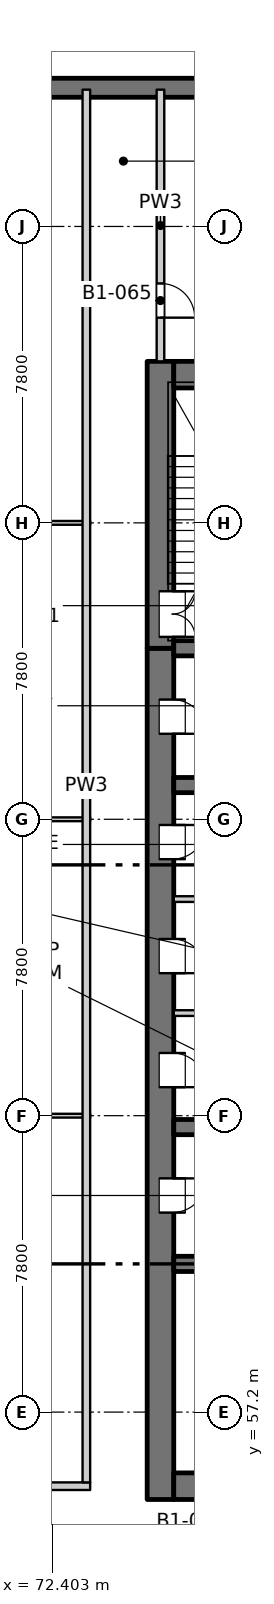
"""IFC4 building model, lengths in metres.
Left out: names, types, materials, properties, quantities, classifications, styles, units other than length and angle.
Written with IfcOpenShell. Run it as: python <this file> out.ifc"""

import sys

from ifc_helpers import new_model, si_unit, direction, frame, frame_2d, origin, place, context, subcontext, project, spatial, rectangle, extrude, element, fill, save


model = new_model("IFC4")
c1 = context("Model", 3, precision=1e-05, world=origin(), true_north=direction((0.0, 1.0)))
c2 = subcontext(c1, "Body", "Model", "MODEL_VIEW")
j1 = project(units=[si_unit("LENGTHUNIT", "METRE"), si_unit("PLANEANGLEUNIT", "RADIAN")], contexts=[c1])
p1 = place(None, origin())
s1 = spatial("IfcSite", under=j1, at=p1, CompositionType="ELEMENT")
p2 = place(p1, origin())
s2 = spatial("IfcBuilding", under=s1, at=p2, CompositionType="ELEMENT")
p3 = place(p2, frame((0.0, 0.0, -4.5)))
s3 = spatial("IfcBuildingStorey", under=s2, at=p3, CompositionType="ELEMENT", Elevation=-4.5)
p4 = place(p3, frame((42.6, 92.05, -0.35), z_axis=(0.0, 0.0, 1.0), x_axis=(1.0, 0.0, 0.0)))
e1 = element("IfcWall", 1, at=p4, inside=s3, PredefinedType="SOLIDWALL", context=c2, shape_type="SweptSolid", body=[
    extrude(rectangle(XDim=84.8, YDim=0.5, at=frame_2d((42.4, 0.0))), origin(), (0.0, 0.0, 1.0), 4.45),
])
p5 = place(p3, frame((75.25, 54.9, -0.35), z_axis=(0.0, 0.0, 1.0), x_axis=(0.0, 1.0, 0.0)))
e2 = element("IfcWall", 2, at=p5, inside=s3, PredefinedType="SOLIDWALL", context=c2, shape_type="SweptSolid", body=[
    extrude(rectangle(XDim=22.4, YDim=0.7, at=frame_2d((11.2, 0.0))), origin(), (0.0, 0.0, 1.0), 4.45),
])
p6 = place(p5, frame((7.55, 0.0, 0.35)))
e3 = element("IfcOpeningElement", 3, at=p6, cuts=e2, PredefinedType="OPENING", context=c2, shape_type="SweptSolid", body=[
    extrude(rectangle(XDim=0.9, YDim=2.1, at=frame_2d((0.45, 1.05))), frame((0.0, 0.36, 0.0), z_axis=(0.0, -1.0, 0.0), x_axis=(1.0, 0.0, 0.0)), (0.0, 0.0, 1.0), 0.72),
])
p7 = place(p5, frame((10.85, 0.0, 0.35)))
e4 = element("IfcOpeningElement", 4, at=p7, cuts=e2, PredefinedType="OPENING", context=c2, shape_type="SweptSolid", body=[
    extrude(rectangle(XDim=0.9, YDim=2.1, at=frame_2d((0.45, 1.05))), frame((0.0, 0.36, 0.0), z_axis=(0.0, -1.0, 0.0), x_axis=(1.0, 0.0, 0.0)), (0.0, 0.0, 1.0), 0.72),
])
p8 = place(p5, frame((13.85, 0.0, 0.35)))
e5 = element("IfcOpeningElement", 5, at=p8, cuts=e2, PredefinedType="OPENING", context=c2, shape_type="SweptSolid", body=[
    extrude(rectangle(XDim=0.9, YDim=2.1, at=frame_2d((0.45, 1.05))), frame((0.0, 0.36, 0.0), z_axis=(0.0, -1.0, 0.0), x_axis=(1.0, 0.0, 0.0)), (0.0, 0.0, 1.0), 0.72),
])
p9 = place(p5, frame((16.85, 0.0, 0.35)))
e6 = element("IfcOpeningElement", 6, at=p9, cuts=e2, PredefinedType="OPENING", context=c2, shape_type="SweptSolid", body=[
    extrude(rectangle(XDim=0.9, YDim=2.1, at=frame_2d((0.45, 1.05))), frame((0.0, 0.36, 0.0), z_axis=(0.0, -1.0, 0.0), x_axis=(1.0, 0.0, 0.0)), (0.0, 0.0, 1.0), 0.72),
])
p10 = place(p5, frame((20.15, 0.0, 0.35)))
e7 = element("IfcOpeningElement", 7, at=p10, cuts=e2, PredefinedType="OPENING", context=c2, shape_type="SweptSolid", body=[
    extrude(rectangle(XDim=0.9, YDim=2.1, at=frame_2d((0.45, 1.05))), frame((0.0, 0.36, 0.0), z_axis=(0.0, -1.0, 0.0), x_axis=(1.0, 0.0, 0.0)), (0.0, 0.0, 1.0), 0.72),
])
p11 = place(p3, frame((75.25, 77.3, -0.35), z_axis=(0.0, 0.0, 1.0), x_axis=(0.0, 1.0, 0.0)))
e8 = element("IfcWall", 8, at=p11, inside=s3, PredefinedType="SOLIDWALL", context=c2, shape_type="SweptSolid", body=[
    extrude(rectangle(XDim=7.55, YDim=0.7, at=frame_2d((3.775, 0.0))), origin(), (0.0, 0.0, 1.0), 4.45),
])
p12 = place(p11, frame((0.3, 0.0, 0.35)))
e9 = element("IfcOpeningElement", 9, at=p12, cuts=e8, PredefinedType="OPENING", context=c2, shape_type="SweptSolid", body=[
    extrude(rectangle(XDim=1.2, YDim=2.1, at=frame_2d((0.6, 1.05))), frame((0.0, 0.36, 0.0), z_axis=(0.0, -1.0, 0.0), x_axis=(1.0, 0.0, 0.0)), (0.0, 0.0, 1.0), 0.72),
])
p13 = place(p3, frame((75.6, 55.25, -0.35), z_axis=(0.0, 0.0, 1.0), x_axis=(1.0, 0.0, 0.0)))
e10 = element("IfcWall", 10, at=p13, inside=s3, PredefinedType="SOLIDWALL", context=c2, shape_type="SweptSolid", body=[
    extrude(rectangle(XDim=18.8, YDim=0.7, at=frame_2d((9.4, 0.0))), origin(), (0.0, 0.0, 1.0), 4.45),
])
p14 = place(p13, frame((8.65, 0.0, 0.35)))
e11 = element("IfcOpeningElement", 11, at=p14, cuts=e10, PredefinedType="OPENING", context=c2, shape_type="SweptSolid", body=[
    extrude(rectangle(XDim=1.5, YDim=2.1, at=frame_2d((0.75, 1.05))), frame((0.0, 0.36, 0.0), z_axis=(0.0, -1.0, 0.0), x_axis=(1.0, 0.0, 0.0)), (0.0, 0.0, 1.0), 0.72),
])
p15 = place(p3, frame((75.6, 84.5, -0.35), z_axis=(0.0, 0.0, 1.0), x_axis=(1.0, 0.0, 0.0)))
e12 = element("IfcWall", 12, at=p15, inside=s3, PredefinedType="SOLIDWALL", context=c2, shape_type="SweptSolid", body=[
    extrude(rectangle(XDim=18.8, YDim=0.7, at=frame_2d((9.4, 0.0))), origin(), (0.0, 0.0, 1.0), 4.45),
])
for number, where, z_axis, x_axis in (
    (13, (75.6, 61.1, -0.35), (0.0, 0.0, 1.0), (1.0, 0.0, 0.0)),
    (14, (75.6, 64.7, -0.35), (0.0, 0.0, 1.0), (1.0, 0.0, 0.0)),
    (15, (75.6, 73.7, -0.35), (0.0, 0.0, 1.0), (1.0, 0.0, 0.0)),
    (16, (75.6, 77.3, -0.35), (0.0, 0.0, 1.0), (1.0, 0.0, 0.0)),
):
    element("IfcWall", number, at=place(p3, frame(where, z_axis=z_axis, x_axis=x_axis)), inside=s3, PredefinedType="SOLIDWALL", context=c2, shape_type="SweptSolid", body=[
        extrude(rectangle(XDim=3.65, YDim=0.4, at=frame_2d((1.825, 0.0))), origin(), (0.0, 0.0, 1.0), 4.45),
    ])
p16 = place(p3, frame((59.55, 55.25, 0.0), z_axis=(0.0, 0.0, 1.0), x_axis=(1.0, 0.0, 0.0)))
e17 = element("IfcWall", 17, at=p16, inside=s3, PredefinedType="PARTITIONING", context=c2, shape_type="SweptSolid", body=[
    extrude(rectangle(XDim=13.85, YDim=0.2, at=frame_2d((6.925, 0.0))), origin(), (0.0, 0.0, 1.0), 4.1),
])
p17 = place(p3, frame((59.55, 65.0, 0.0), z_axis=(0.0, 0.0, 1.0), x_axis=(1.0, 0.0, 0.0)))
e18 = element("IfcWall", 18, at=p17, inside=s3, PredefinedType="PARTITIONING", context=c2, shape_type="SweptSolid", body=[
    extrude(rectangle(XDim=13.85, YDim=0.1, at=frame_2d((6.925, 0.0))), origin(), (0.0, 0.0, 1.0), 4.1),
])
for number, where, z_axis, x_axis in (
    (19, (75.6, 67.7, 0.0), (0.0, 0.0, 1.0), (1.0, 0.0, 0.0)),
    (20, (75.6, 70.7, 0.0), (0.0, 0.0, 1.0), (1.0, 0.0, 0.0)),
):
    element("IfcWall", number, at=place(p3, frame(where, z_axis=z_axis, x_axis=x_axis)), inside=s3, PredefinedType="PARTITIONING", context=c2, shape_type="SweptSolid", body=[
        extrude(rectangle(XDim=3.65, YDim=0.15, at=frame_2d((1.825, 0.0))), origin(), (0.0, 0.0, 1.0), 4.1),
    ])
for number, where, z_axis, x_axis in (
    (21, (59.55, 72.8, 0.0), (0.0, 0.0, 1.0), (1.0, 0.0, 0.0)),
    (22, (59.55, 80.6, 0.0), (0.0, 0.0, 1.0), (1.0, 0.0, 0.0)),
):
    element("IfcWall", number, at=place(p3, frame(where, z_axis=z_axis, x_axis=x_axis)), inside=s3, PredefinedType="PARTITIONING", context=c2, shape_type="SweptSolid", body=[
        extrude(rectangle(XDim=13.85, YDim=0.1, at=frame_2d((6.925, 0.0))), origin(), (0.0, 0.0, 1.0), 4.1),
    ])
p18 = place(p3, frame((73.3, 55.35, 0.0), z_axis=(0.0, 0.0, 1.0), x_axis=(0.0, 1.0, 0.0)))
e23 = element("IfcWall", 23, at=p18, inside=s3, PredefinedType="PARTITIONING", context=c2, shape_type="SweptSolid", body=[
    extrude(rectangle(XDim=36.65, YDim=0.2, at=frame_2d((18.325, 0.0))), origin(), (0.0, 0.0, 1.0), 4.1),
])
p19 = place(p3, frame((75.25, 84.85, 0.0), z_axis=(0.0, 0.0, 1.0), x_axis=(0.0, 1.0, 0.0)))
e24 = element("IfcWall", 24, at=p19, inside=s3, PredefinedType="PARTITIONING", context=c2, shape_type="SweptSolid", body=[
    extrude(rectangle(XDim=7.15, YDim=0.2, at=frame_2d((3.575, 0.0))), origin(), (0.0, 0.0, 1.0), 4.1),
])
p20 = place(p19, frame((1.15, 0.0, 0.0)))
e25 = element("IfcOpeningElement", 25, at=p20, cuts=e24, PredefinedType="OPENING", context=c2, shape_type="SweptSolid", body=[
    extrude(rectangle(XDim=0.9, YDim=2.1, at=frame_2d((0.45, 1.05))), frame((0.0, 0.11, 0.0), z_axis=(0.0, -1.0, 0.0), x_axis=(1.0, 0.0, 0.0)), (0.0, 0.0, 1.0), 0.22),
])
p21 = place(p6, origin())
e26 = element("IfcDoor", 26, at=p21, inside=s3, OperationType="SINGLE_SWING_LEFT", PredefinedType="DOOR", context=c2, shape_type="SweptSolid", body=[
    extrude(rectangle(XDim=0.9, YDim=2.1, at=frame_2d((0.45, 1.05))), frame((0.0, -0.285, 0.0), z_axis=(0.0, -1.0, 0.0), x_axis=(1.0, 0.0, 0.0)), (0.0, 0.0, 1.0), 0.05),
])
fill(e3, e26)
p22 = place(p7, origin())
e27 = element("IfcDoor", 27, at=p22, inside=s3, OperationType="SINGLE_SWING_RIGHT", PredefinedType="DOOR", context=c2, shape_type="SweptSolid", body=[
    extrude(rectangle(XDim=0.9, YDim=2.1, at=frame_2d((0.45, 1.05))), frame((0.0, -0.285, 0.0), z_axis=(0.0, -1.0, 0.0), x_axis=(1.0, 0.0, 0.0)), (0.0, 0.0, 1.0), 0.05),
])
fill(e4, e27)
p23 = place(p8, origin())
e28 = element("IfcDoor", 28, at=p23, inside=s3, OperationType="SINGLE_SWING_RIGHT", PredefinedType="DOOR", context=c2, shape_type="SweptSolid", body=[
    extrude(rectangle(XDim=0.9, YDim=2.1, at=frame_2d((0.45, 1.05))), frame((0.0, -0.285, 0.0), z_axis=(0.0, -1.0, 0.0), x_axis=(1.0, 0.0, 0.0)), (0.0, 0.0, 1.0), 0.05),
])
fill(e5, e28)
p24 = place(p9, origin())
e29 = element("IfcDoor", 29, at=p24, inside=s3, OperationType="SINGLE_SWING_LEFT", PredefinedType="DOOR", context=c2, shape_type="SweptSolid", body=[
    extrude(rectangle(XDim=0.9, YDim=2.1, at=frame_2d((0.45, 1.05))), frame((0.0, -0.285, 0.0), z_axis=(0.0, -1.0, 0.0), x_axis=(1.0, 0.0, 0.0)), (0.0, 0.0, 1.0), 0.05),
])
fill(e6, e29)
p25 = place(p10, origin())
e30 = element("IfcDoor", 30, at=p25, inside=s3, OperationType="SINGLE_SWING_RIGHT", PredefinedType="DOOR", context=c2, shape_type="SweptSolid", body=[
    extrude(rectangle(XDim=0.9, YDim=2.1, at=frame_2d((0.45, 1.05))), frame((0.0, -0.285, 0.0), z_axis=(0.0, -1.0, 0.0), x_axis=(1.0, 0.0, 0.0)), (0.0, 0.0, 1.0), 0.05),
])
fill(e7, e30)
p26 = place(p12, origin())
e31 = element("IfcDoor", 31, at=p26, inside=s3, OperationType="DOUBLE_DOOR_SINGLE_SWING", PredefinedType="DOOR", context=c2, shape_type="SweptSolid", body=[
    extrude(rectangle(XDim=1.2, YDim=2.1, at=frame_2d((0.6, 1.05))), frame((0.0, -0.285, 0.0), z_axis=(0.0, -1.0, 0.0), x_axis=(1.0, 0.0, 0.0)), (0.0, 0.0, 1.0), 0.05),
])
fill(e9, e31)
p27 = place(p20, origin())
e32 = element("IfcDoor", 32, at=p27, inside=s3, OperationType="SINGLE_SWING_RIGHT", PredefinedType="DOOR", context=c2, shape_type="SweptSolid", body=[
    extrude(rectangle(XDim=0.9, YDim=2.1, at=frame_2d((0.45, 1.05))), frame((0.0, 0.025, 0.0), z_axis=(0.0, -1.0, 0.0), x_axis=(1.0, 0.0, 0.0)), (0.0, 0.0, 1.0), 0.05),
])
fill(e25, e32)
save(model, sys.argv[1])
